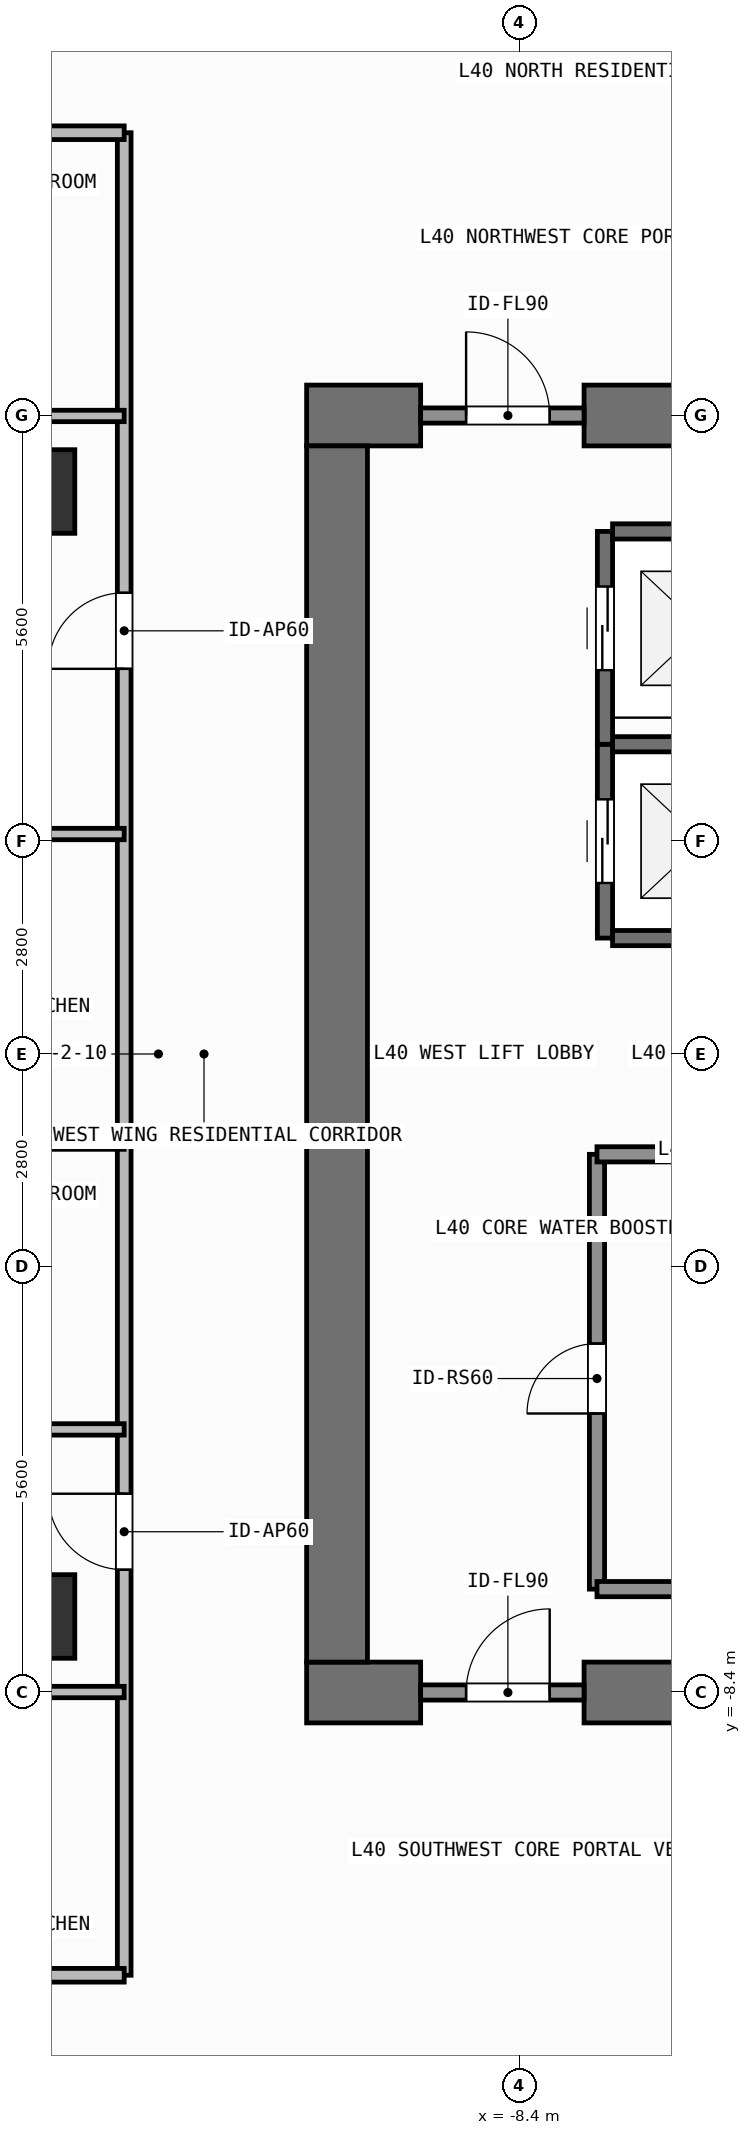
"""IFC4 building model, lengths in metres.
Left out: names, types, materials, properties, quantities, classifications, styles, units other than length and angle.
Written with IfcOpenShell. Run it as: python <this file> out.ifc"""

import sys

from ifc_helpers import new_model, si_unit, direction, frame, frame_2d, origin, origin_2d, place, context, subcontext, project, spatial, rectangle, extrude, element, fill, save


model = new_model("IFC4")
c1 = context("Model", 3, precision=1e-05, world=origin(), true_north=direction((0.0, 1.0)))
c2 = subcontext(c1, "Body", "Model", "MODEL_VIEW")
j1 = project(units=[si_unit("LENGTHUNIT", "METRE"), si_unit("PLANEANGLEUNIT", "RADIAN")], contexts=[c1])
p1 = place(None, origin())
s1 = spatial("IfcSite", under=j1, at=p1, CompositionType="ELEMENT")
p2 = place(p1, origin())
s2 = spatial("IfcBuilding", under=s1, at=p2, CompositionType="ELEMENT")
p3 = place(p2, frame((0.0, 0.0, 164.1)))
s3 = spatial("IfcBuildingStorey", under=s2, at=p3, CompositionType="ELEMENT", Elevation=164.1)
p4 = place(p3, frame((-11.2, -8.4, 0.0), z_axis=(0.0, 0.0, 1.0), x_axis=(1.0, 0.0, 0.0)))
e1 = element("IfcWall", 1, at=p4, inside=s3, PredefinedType="SHEAR", context=c2, shape_type="SweptSolid", body=[
    extrude(rectangle(XDim=1.5, YDim=0.8, at=frame_2d((0.75, 0.0))), origin(), (0.0, 0.0, 1.0), 3.9),
])
p5 = place(p3, frame((-7.55, -8.4, 0.0), z_axis=(0.0, 0.0, 1.0), x_axis=(1.0, 0.0, 0.0)))
e2 = element("IfcWall", 2, at=p5, inside=s3, PredefinedType="SHEAR", context=c2, shape_type="SweptSolid", body=[
    extrude(rectangle(XDim=3.35, YDim=0.8, at=frame_2d((1.675, 0.0))), origin(), (0.0, 0.0, 1.0), 3.9),
])
p6 = place(p3, frame((-11.2, 8.4, 0.0), z_axis=(0.0, 0.0, 1.0), x_axis=(1.0, 0.0, 0.0)))
e3 = element("IfcWall", 3, at=p6, inside=s3, PredefinedType="SHEAR", context=c2, shape_type="SweptSolid", body=[
    extrude(rectangle(XDim=1.5, YDim=0.8, at=frame_2d((0.75, 0.0))), origin(), (0.0, 0.0, 1.0), 3.9),
])
p7 = place(p3, frame((-7.55, 8.4, 0.0), z_axis=(0.0, 0.0, 1.0), x_axis=(1.0, 0.0, 0.0)))
e4 = element("IfcWall", 4, at=p7, inside=s3, PredefinedType="SHEAR", context=c2, shape_type="SweptSolid", body=[
    extrude(rectangle(XDim=16.35, YDim=0.8, at=frame_2d((8.175, 0.0))), origin(), (0.0, 0.0, 1.0), 3.9),
])
p8 = place(p3, frame((-10.8, -8.0, 0.0), z_axis=(0.0, 0.0, 1.0), x_axis=(0.0, 1.0, 0.0)))
e5 = element("IfcWall", 5, at=p8, inside=s3, PredefinedType="SHEAR", context=c2, shape_type="SweptSolid", body=[
    extrude(rectangle(XDim=16.0, YDim=0.8, at=frame_2d((8.0, 0.0))), origin(), (0.0, 0.0, 1.0), 3.9),
])
for number, where, z_axis, x_axis in (
    (6, (-14.8, -7.4, 0.0), (0.0, 0.0, 1.0), (1.0, 0.0, 0.0)),
    (7, (-14.8, 7.4, 0.0), (0.0, 0.0, 1.0), (1.0, 0.0, 0.0)),
):
    element("IfcColumn", number, at=place(p3, frame(where, z_axis=z_axis, x_axis=x_axis)), inside=s3, PredefinedType="COLUMN", context=c2, shape_type="SweptSolid", body=[
        extrude(rectangle(XDim=1.1, YDim=1.1, at=origin_2d()), origin(), (0.0, 0.0, 1.0), 3.9),
    ])
p9 = place(p3, frame((-7.275, 1.525, 0.0), z_axis=(0.0, 0.0, 1.0), x_axis=(0.0, 1.0, 0.0)))
e8 = element("IfcWall", 8, at=p9, inside=s3, PredefinedType="SHEAR", context=c2, shape_type="SweptSolid", body=[
    extrude(rectangle(XDim=2.55, YDim=0.2, at=frame_2d((1.275, 0.0))), origin(), (0.0, 0.0, 1.0), 3.62),
])
p10 = place(p9, frame((0.725, 0.0, 0.0)))
e9 = element("IfcOpeningElement", 9, at=p10, cuts=e8, PredefinedType="OPENING", context=c2, shape_type="SweptSolid", body=[
    extrude(rectangle(XDim=1.1, YDim=2.2, at=frame_2d((0.55, 1.1))), frame((0.0, 0.11, 0.0), z_axis=(0.0, -1.0, 0.0), x_axis=(1.0, 0.0, 0.0)), (0.0, 0.0, 1.0), 0.22),
])
for number, where, z_axis, x_axis in (
    (10, (-7.175, 1.525, 0.0), (0.0, 0.0, 1.0), (1.0, 0.0, 0.0)),
    (11, (-7.175, 4.075, 0.0), (0.0, 0.0, 1.0), (1.0, 0.0, 0.0)),
):
    element("IfcWall", number, at=place(p3, frame(where, z_axis=z_axis, x_axis=x_axis)), inside=s3, PredefinedType="SHEAR", context=c2, shape_type="SweptSolid", body=[
        extrude(rectangle(XDim=2.35, YDim=0.2, at=frame_2d((1.175, 0.0))), origin(), (0.0, 0.0, 1.0), 3.62),
    ])
p11 = place(p3, frame((-7.275, 4.075, 0.0), z_axis=(0.0, 0.0, 1.0), x_axis=(0.0, 1.0, 0.0)))
e12 = element("IfcWall", 12, at=p11, inside=s3, PredefinedType="SHEAR", context=c2, shape_type="SweptSolid", body=[
    extrude(rectangle(XDim=2.8, YDim=0.2, at=frame_2d((1.4, 0.0))), origin(), (0.0, 0.0, 1.0), 3.62),
])
p12 = place(p11, frame((0.975, 0.0, 0.0)))
e13 = element("IfcOpeningElement", 13, at=p12, cuts=e12, PredefinedType="OPENING", context=c2, shape_type="SweptSolid", body=[
    extrude(rectangle(XDim=1.1, YDim=2.2, at=frame_2d((0.55, 1.1))), frame((0.0, 0.11, 0.0), z_axis=(0.0, -1.0, 0.0), x_axis=(1.0, 0.0, 0.0)), (0.0, 0.0, 1.0), 0.22),
])
p13 = place(p3, frame((-7.175, 6.875, 0.0), z_axis=(0.0, 0.0, 1.0), x_axis=(1.0, 0.0, 0.0)))
e14 = element("IfcWall", 14, at=p13, inside=s3, PredefinedType="SHEAR", context=c2, shape_type="SweptSolid", body=[
    extrude(rectangle(XDim=2.35, YDim=0.2, at=frame_2d((1.175, 0.0))), origin(), (0.0, 0.0, 1.0), 3.62),
])
p14 = place(p3, frame((-9.7, -8.4, 0.0), z_axis=(0.0, 0.0, 1.0), x_axis=(1.0, 0.0, 0.0)))
e15 = element("IfcWall", 15, at=p14, inside=s3, PredefinedType="SOLIDWALL", context=c2, shape_type="SweptSolid", body=[
    extrude(rectangle(XDim=2.15, YDim=0.2, at=frame_2d((1.075, 0.0))), origin(), (0.0, 0.0, 1.0), 2.76),
])
p15 = place(p14, frame((0.598, 0.0, 0.0)))
e16 = element("IfcOpeningElement", 16, at=p15, cuts=e15, PredefinedType="OPENING", context=c2, shape_type="SweptSolid", body=[
    extrude(rectangle(XDim=1.1, YDim=2.15, at=frame_2d((0.55, 1.075))), frame((0.0, 0.11, 0.0), z_axis=(0.0, -1.0, 0.0), x_axis=(1.0, 0.0, 0.0)), (0.0, 0.0, 1.0), 0.22),
])
p16 = place(p3, frame((-9.7, 8.4, 0.0), z_axis=(0.0, 0.0, 1.0), x_axis=(1.0, 0.0, 0.0)))
e17 = element("IfcWall", 17, at=p16, inside=s3, PredefinedType="SOLIDWALL", context=c2, shape_type="SweptSolid", body=[
    extrude(rectangle(XDim=2.15, YDim=0.2, at=frame_2d((1.075, 0.0))), origin(), (0.0, 0.0, 1.0), 2.76),
])
p17 = place(p16, frame((0.598, 0.0, 0.0)))
e18 = element("IfcOpeningElement", 18, at=p17, cuts=e17, PredefinedType="OPENING", context=c2, shape_type="SweptSolid", body=[
    extrude(rectangle(XDim=1.1, YDim=2.15, at=frame_2d((0.55, 1.075))), frame((0.0, 0.11, 0.0), z_axis=(0.0, -1.0, 0.0), x_axis=(1.0, 0.0, 0.0)), (0.0, 0.0, 1.0), 0.22),
])
p18 = place(p3, frame((-7.38, -7.04, 0.0), z_axis=(0.0, 0.0, 1.0), x_axis=(0.0, 1.0, 0.0)))
e19 = element("IfcWall", 19, at=p18, inside=s3, PredefinedType="SOLIDWALL", context=c2, shape_type="SweptSolid", body=[
    extrude(rectangle(XDim=5.72, YDim=0.2, at=frame_2d((2.86, 0.0))), origin(), (0.0, 0.0, 1.0), 3.62),
])
p19 = place(p18, frame((2.31, 0.0, 0.0)))
e20 = element("IfcOpeningElement", 20, at=p19, cuts=e19, PredefinedType="OPENING", context=c2, shape_type="SweptSolid", body=[
    extrude(rectangle(XDim=0.92, YDim=2.1, at=frame_2d((0.46, 1.05))), frame((0.0, 0.11, 0.0), z_axis=(0.0, -1.0, 0.0), x_axis=(1.0, 0.0, 0.0)), (0.0, 0.0, 1.0), 0.22),
])
p20 = place(p3, frame((-13.6, -12.12, 0.0), z_axis=(0.0, 0.0, 1.0), x_axis=(0.0, 1.0, 0.0)))
e21 = element("IfcWall", 21, at=p20, inside=s3, PredefinedType="PARTITIONING", context=c2, shape_type="SweptSolid", body=[
    extrude(rectangle(XDim=10.956, YDim=0.18, at=frame_2d((5.478, 0.0))), origin(), (0.0, 0.0, 1.0), 3.62),
])
p21 = place(p20, frame((5.335, 0.0, 0.0)))
e22 = element("IfcOpeningElement", 22, at=p21, cuts=e21, PredefinedType="OPENING", context=c2, shape_type="SweptSolid", body=[
    extrude(rectangle(XDim=1.0, YDim=2.2, at=frame_2d((0.5, 1.1))), frame((0.0, 0.1, 0.0), z_axis=(0.0, -1.0, 0.0), x_axis=(1.0, 0.0, 0.0)), (0.0, 0.0, 1.0), 0.2),
])
p22 = place(p3, frame((-16.784, -4.939, 0.0), z_axis=(0.0, 0.0, 1.0), x_axis=(1.0, 0.0, 0.0)))
e23 = element("IfcWall", 23, at=p22, inside=s3, PredefinedType="PARTITIONING", context=c2, shape_type="SweptSolid", body=[
    extrude(rectangle(XDim=3.184, YDim=0.15, at=frame_2d((1.592, 0.0))), origin(), (0.0, 0.0, 1.0), 3.62),
])
p23 = place(p22, frame((1.167, 0.0, 0.0)))
e24 = element("IfcOpeningElement", 24, at=p23, cuts=e23, PredefinedType="OPENING", context=c2, shape_type="SweptSolid", body=[
    extrude(rectangle(XDim=0.85, YDim=2.1, at=frame_2d((0.425, 1.05))), frame((0.0, 0.085, 0.0), z_axis=(0.0, -1.0, 0.0), x_axis=(1.0, 0.0, 0.0)), (0.0, 0.0, 1.0), 0.17),
])
p24 = place(p3, frame((-16.784, -8.394, 0.0), z_axis=(0.0, 0.0, 1.0), x_axis=(1.0, 0.0, 0.0)))
e25 = element("IfcWall", 25, at=p24, inside=s3, PredefinedType="PARTITIONING", context=c2, shape_type="SweptSolid", body=[
    extrude(rectangle(XDim=3.184, YDim=0.15, at=frame_2d((1.592, 0.0))), origin(), (0.0, 0.0, 1.0), 3.62),
])
p25 = place(p24, frame((0.496, 0.0, 0.0)))
e26 = element("IfcOpeningElement", 26, at=p25, cuts=e25, PredefinedType="OPENING", context=c2, shape_type="SweptSolid", body=[
    extrude(rectangle(XDim=0.85, YDim=2.1, at=frame_2d((0.425, 1.05))), frame((0.0, 0.085, 0.0), z_axis=(0.0, -1.0, 0.0), x_axis=(1.0, 0.0, 0.0)), (0.0, 0.0, 1.0), 0.17),
])
p26 = place(p3, frame((-13.6, -1.164, 0.0), z_axis=(0.0, 0.0, 1.0), x_axis=(0.0, 1.0, 0.0)))
e27 = element("IfcWall", 27, at=p26, inside=s3, PredefinedType="PARTITIONING", context=c2, shape_type="SweptSolid", body=[
    extrude(rectangle(XDim=13.284, YDim=0.18, at=frame_2d((6.642, 0.0))), origin(), (0.0, 0.0, 1.0), 3.62),
])
p27 = place(p26, frame((6.231, 0.0, 0.0)))
e28 = element("IfcOpeningElement", 28, at=p27, cuts=e27, PredefinedType="OPENING", context=c2, shape_type="SweptSolid", body=[
    extrude(rectangle(XDim=1.0, YDim=2.2, at=frame_2d((0.5, 1.1))), frame((0.0, 0.1, 0.0), z_axis=(0.0, -1.0, 0.0), x_axis=(1.0, 0.0, 0.0)), (0.0, 0.0, 1.0), 0.2),
])
p28 = place(p3, frame((-16.784, 8.394, 0.0), z_axis=(0.0, 0.0, 1.0), x_axis=(1.0, 0.0, 0.0)))
e29 = element("IfcWall", 29, at=p28, inside=s3, PredefinedType="PARTITIONING", context=c2, shape_type="SweptSolid", body=[
    extrude(rectangle(XDim=3.184, YDim=0.15, at=frame_2d((1.592, 0.0))), origin(), (0.0, 0.0, 1.0), 3.62),
])
p29 = place(p28, frame((0.496, 0.0, 0.0)))
e30 = element("IfcOpeningElement", 30, at=p29, cuts=e29, PredefinedType="OPENING", context=c2, shape_type="SweptSolid", body=[
    extrude(rectangle(XDim=0.85, YDim=2.1, at=frame_2d((0.425, 1.05))), frame((0.0, 0.085, 0.0), z_axis=(0.0, -1.0, 0.0), x_axis=(1.0, 0.0, 0.0)), (0.0, 0.0, 1.0), 0.17),
])
p30 = place(p3, frame((-16.784, 2.894, 0.0), z_axis=(0.0, 0.0, 1.0), x_axis=(1.0, 0.0, 0.0)))
e31 = element("IfcWall", 31, at=p30, inside=s3, PredefinedType="PARTITIONING", context=c2, shape_type="SweptSolid", body=[
    extrude(rectangle(XDim=3.184, YDim=0.15, at=frame_2d((1.592, 0.0))), origin(), (0.0, 0.0, 1.0), 3.62),
])
p31 = place(p30, frame((1.167, 0.0, 0.0)))
e32 = element("IfcOpeningElement", 32, at=p31, cuts=e31, PredefinedType="OPENING", context=c2, shape_type="SweptSolid", body=[
    extrude(rectangle(XDim=0.85, YDim=2.1, at=frame_2d((0.425, 1.05))), frame((0.0, 0.085, 0.0), z_axis=(0.0, -1.0, 0.0), x_axis=(1.0, 0.0, 0.0)), (0.0, 0.0, 1.0), 0.17),
])
p32 = place(p3, frame((-7.38, -1.32, 0.0), z_axis=(0.0, 0.0, 1.0), x_axis=(1.0, 0.0, 0.0)))
e33 = element("IfcWall", 33, at=p32, inside=s3, PredefinedType="SOLIDWALL", context=c2, shape_type="SweptSolid", body=[
    extrude(rectangle(XDim=2.91, YDim=0.2, at=frame_2d((1.455, 0.0))), origin(), (0.0, 0.0, 1.0), 3.62),
])
p33 = place(p3, frame((-7.38, -7.04, 0.0), z_axis=(0.0, 0.0, 1.0), x_axis=(1.0, 0.0, 0.0)))
e34 = element("IfcWall", 34, at=p33, inside=s3, PredefinedType="SOLIDWALL", context=c2, shape_type="SweptSolid", body=[
    extrude(rectangle(XDim=2.8, YDim=0.2, at=frame_2d((1.4, 0.0))), origin(), (0.0, 0.0, 1.0), 3.62),
])
for number, where, z_axis, x_axis in (
    (35, (-19.73, -1.164, 0.0), (0.0, 0.0, 1.0), (1.0, 0.0, 0.0)),
    (36, (-19.73, -12.12, 0.0), (0.0, 0.0, 1.0), (1.0, 0.0, 0.0)),
    (37, (-19.73, 12.12, 0.0), (0.0, 0.0, 1.0), (1.0, 0.0, 0.0)),
):
    element("IfcWall", number, at=place(p3, frame(where, z_axis=z_axis, x_axis=x_axis)), inside=s3, PredefinedType="PARTITIONING", context=c2, shape_type="SweptSolid", body=[
        extrude(rectangle(XDim=6.13, YDim=0.18, at=frame_2d((3.065, 0.0))), origin(), (0.0, 0.0, 1.0), 3.62),
    ])
p34 = place(p10, origin())
e38 = element("IfcDoor", 38, at=p34, inside=s3, OperationType="SLIDING_TO_LEFT", PredefinedType="DOOR", context=c2, shape_type="SweptSolid", body=[
    extrude(rectangle(XDim=1.1, YDim=2.2, at=frame_2d((0.55, 1.1))), frame((0.0, 0.025, 0.0), z_axis=(0.0, -1.0, 0.0), x_axis=(1.0, 0.0, 0.0)), (0.0, 0.0, 1.0), 0.05),
])
fill(e9, e38)
p35 = place(p12, origin())
e39 = element("IfcDoor", 39, at=p35, inside=s3, OperationType="SLIDING_TO_LEFT", PredefinedType="DOOR", context=c2, shape_type="SweptSolid", body=[
    extrude(rectangle(XDim=1.1, YDim=2.2, at=frame_2d((0.55, 1.1))), frame((0.0, 0.025, 0.0), z_axis=(0.0, -1.0, 0.0), x_axis=(1.0, 0.0, 0.0)), (0.0, 0.0, 1.0), 0.05),
])
fill(e13, e39)
p36 = place(p15, origin())
e40 = element("IfcDoor", 40, at=p36, inside=s3, OperationType="SINGLE_SWING_RIGHT", PredefinedType="DOOR", context=c2, shape_type="SweptSolid", body=[
    extrude(rectangle(XDim=1.1, YDim=2.15, at=frame_2d((0.55, 1.075))), frame((0.0, 0.025, 0.0), z_axis=(0.0, -1.0, 0.0), x_axis=(1.0, 0.0, 0.0)), (0.0, 0.0, 1.0), 0.05),
])
fill(e16, e40)
p37 = place(p17, origin())
e41 = element("IfcDoor", 41, at=p37, inside=s3, OperationType="SINGLE_SWING_LEFT", PredefinedType="DOOR", context=c2, shape_type="SweptSolid", body=[
    extrude(rectangle(XDim=1.1, YDim=2.15, at=frame_2d((0.55, 1.075))), frame((0.0, 0.025, 0.0), z_axis=(0.0, -1.0, 0.0), x_axis=(1.0, 0.0, 0.0)), (0.0, 0.0, 1.0), 0.05),
])
fill(e18, e41)
p38 = place(p19, origin())
e42 = element("IfcDoor", 42, at=p38, inside=s3, OperationType="SINGLE_SWING_LEFT", PredefinedType="DOOR", context=c2, shape_type="SweptSolid", body=[
    extrude(rectangle(XDim=0.92, YDim=2.1, at=frame_2d((0.46, 1.05))), frame((0.0, 0.025, 0.0), z_axis=(0.0, -1.0, 0.0), x_axis=(1.0, 0.0, 0.0)), (0.0, 0.0, 1.0), 0.05),
])
fill(e20, e42)
p39 = place(p21, origin())
e43 = element("IfcDoor", 43, at=p39, inside=s3, OperationType="SINGLE_SWING_RIGHT", PredefinedType="DOOR", context=c2, shape_type="SweptSolid", body=[
    extrude(rectangle(XDim=1.0, YDim=2.2, at=frame_2d((0.5, 1.1))), frame((0.0, 0.025, 0.0), z_axis=(0.0, -1.0, 0.0), x_axis=(1.0, 0.0, 0.0)), (0.0, 0.0, 1.0), 0.05),
])
fill(e22, e43)
p40 = place(p27, origin())
e44 = element("IfcDoor", 44, at=p40, inside=s3, OperationType="SINGLE_SWING_LEFT", PredefinedType="DOOR", context=c2, shape_type="SweptSolid", body=[
    extrude(rectangle(XDim=1.0, YDim=2.2, at=frame_2d((0.5, 1.1))), frame((0.0, 0.025, 0.0), z_axis=(0.0, -1.0, 0.0), x_axis=(1.0, 0.0, 0.0)), (0.0, 0.0, 1.0), 0.05),
])
fill(e28, e44)
save(model, sys.argv[1])
